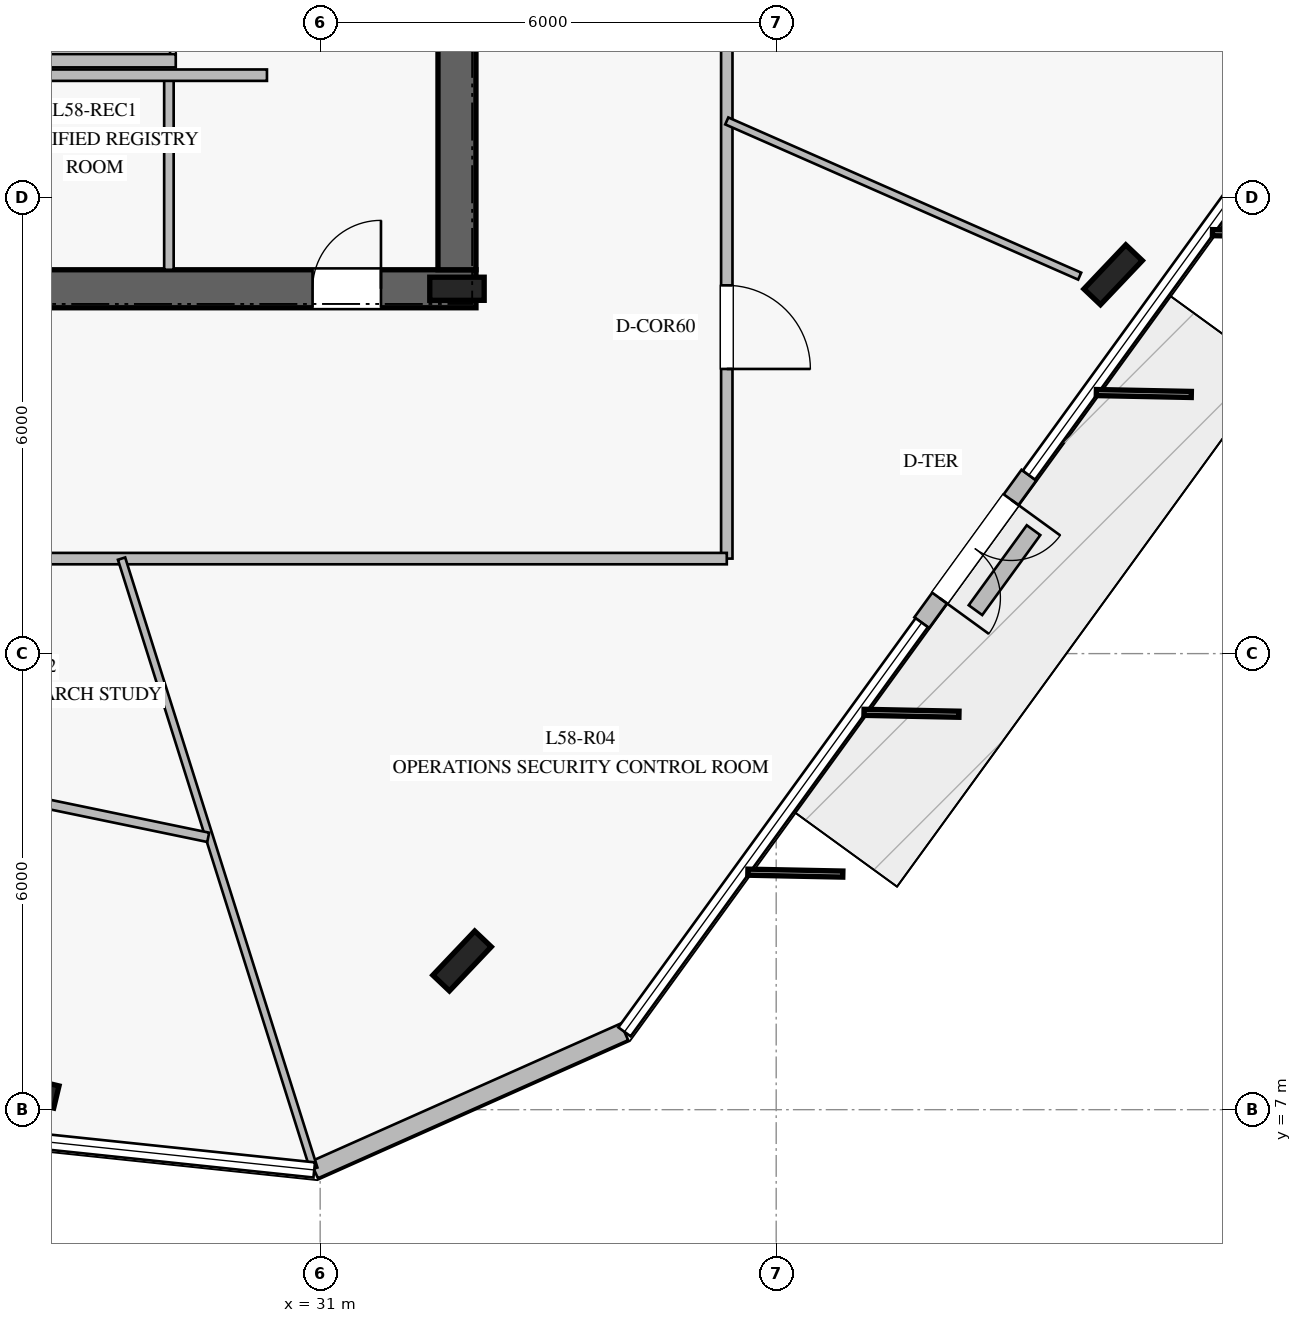
"""IFC4 building model, lengths in metres.
Left out: names, types, materials, properties, quantities, classifications, styles, units other than length and angle.
Written with IfcOpenShell. Run it as: python <this file> out.ifc"""

import sys

from ifc_helpers import new_model, si_unit, direction, frame, frame_2d, origin, origin_2d, place, context, subcontext, project, spatial, rectangle, i_section, extrude, element, fill, save


model = new_model("IFC4")
c1 = context("Model", 3, precision=1e-05, world=origin(), true_north=direction((0.0, 1.0)))
c2 = subcontext(c1, "Body", "Model", "MODEL_VIEW")
j1 = project(units=[si_unit("LENGTHUNIT", "METRE"), si_unit("PLANEANGLEUNIT", "RADIAN")], contexts=[c1])
p1 = place(None, origin())
s1 = spatial("IfcSite", under=j1, at=p1, CompositionType="ELEMENT")
p2 = place(p1, origin())
s2 = spatial("IfcBuilding", under=s1, at=p2, CompositionType="ELEMENT")
p3 = place(p2, frame((0.0, 0.0, 240.8)))
s3 = spatial("IfcBuildingStorey", under=s2, at=p3, CompositionType="ELEMENT", Elevation=240.8)
p4 = place(p3, frame((16.95, 17.8, 0.0), z_axis=(0.0, 0.0, 1.0), x_axis=(1.0, 0.0, 0.0)))
e1 = element("IfcWall", 1, at=p4, inside=s3, PredefinedType="SHEAR", context=c2, shape_type="SweptSolid", body=[
    extrude(rectangle(XDim=16.1, YDim=0.5, at=frame_2d((8.05, 0.0))), origin(), (0.0, 0.0, 1.0), 3.7),
])
p5 = place(p4, frame((5.0, 0.0, 0.0)))
e2 = element("IfcOpeningElement", 2, at=p5, cuts=e1, PredefinedType="OPENING", context=c2, shape_type="SweptSolid", body=[
    extrude(rectangle(XDim=1.2, YDim=2.25, at=frame_2d((0.6, 1.125))), frame((0.0, 0.26, 0.0), z_axis=(0.0, -1.0, 0.0), x_axis=(1.0, 0.0, 0.0)), (0.0, 0.0, 1.0), 0.52),
])
p6 = place(p4, frame((13.95, 0.0, 0.0)))
e3 = element("IfcOpeningElement", 3, at=p6, cuts=e1, PredefinedType="OPENING", context=c2, shape_type="SweptSolid", body=[
    extrude(rectangle(XDim=0.9, YDim=2.1, at=frame_2d((0.45, 1.05))), frame((0.0, 0.26, 0.0), z_axis=(0.0, -1.0, 0.0), x_axis=(1.0, 0.0, 0.0)), (0.0, 0.0, 1.0), 0.52),
])
p7 = place(p4, frame((9.2, 0.0, 0.0)))
e4 = element("IfcOpeningElement", 4, at=p7, cuts=e1, PredefinedType="OPENING", context=c2, shape_type="SweptSolid", body=[
    extrude(rectangle(XDim=1.1, YDim=2.2, at=frame_2d((0.55, 1.1))), frame((0.0, 0.26, 0.0), z_axis=(0.0, -1.0, 0.0), x_axis=(1.0, 0.0, 0.0)), (0.0, 0.0, 1.0), 0.52),
])
p8 = place(p3, frame((32.8, 18.05, 0.0), z_axis=(0.0, 0.0, 1.0), x_axis=(0.0, 1.0, 0.0)))
e5 = element("IfcWall", 5, at=p8, inside=s3, PredefinedType="SHEAR", context=c2, shape_type="SweptSolid", body=[
    extrude(rectangle(XDim=13.9, YDim=0.5, at=frame_2d((6.95, 0.0))), origin(), (0.0, 0.0, 1.0), 3.7),
])
p9 = place(p3, frame((32.8, 17.8, 0.0), z_axis=(0.0, 0.0, 1.0), x_axis=(1.0, 0.0, 0.0)))
e6 = element("IfcColumn", 6, at=p9, inside=s3, PredefinedType="COLUMN", context=c2, shape_type="SweptSolid", body=[
    extrude(i_section(OverallWidth=0.304, OverallDepth=0.716, WebThickness=0.021, FlangeThickness=0.04, at=origin_2d()), origin(), (0.0, 0.0, 1.0), 4.0),
])
for number, where, z_axis, x_axis in (
    (7, (32.867, 8.956, 0.0), (0.0, 0.0, 1.0), (0.688, 0.725, 0.0)),
    (8, (41.433, 17.984, 0.0), (0.0, 0.0, 1.0), (0.688, 0.725, 0.0)),
):
    element("IfcColumn", number, at=place(p3, frame(where, z_axis=z_axis, x_axis=x_axis)), inside=s3, PredefinedType="COLUMN", context=c2, shape_type="SweptSolid", body=[
        extrude(i_section(OverallWidth=0.3, OverallDepth=0.8, WebThickness=0.018, FlangeThickness=0.033, at=origin_2d()), origin(), (0.0, 0.0, 1.0), 4.0),
    ])
p10 = place(p3, frame((30.922, 6.207, 0.0), z_axis=(0.0, 0.0, 1.0), x_axis=(0.913581562374, 0.406655540833, 0.0)))
e9 = element("IfcWall", 9, at=p10, inside=s3, PredefinedType="STANDARD", context=c2, shape_type="SweptSolid", body=[
    extrude(rectangle(XDim=4.468, YDim=0.24, at=frame_2d((2.234, 0.0))), origin(), (0.0, 0.0, 1.0), 3.7),
])
p11 = place(p3, frame((38.915, 13.407, 0.0), z_axis=(0.0, 0.0, 1.0), x_axis=(0.58771776895, 0.809066019593, 0.0)))
e10 = element("IfcWall", 10, at=p11, inside=s3, PredefinedType="STANDARD", context=c2, shape_type="SweptSolid", body=[
    extrude(rectangle(XDim=2.399, YDim=0.24, at=frame_2d((1.199, 0.0))), origin(), (0.0, 0.0, 1.0), 3.7),
])
p12 = place(p11, frame((0.4, 0.0, 0.0)))
e11 = element("IfcOpeningElement", 11, at=p12, cuts=e10, PredefinedType="OPENING", context=c2, shape_type="SweptSolid", body=[
    extrude(rectangle(XDim=1.6, YDim=2.25, at=frame_2d((0.8, 1.125))), frame((0.0, 0.13, 0.0), z_axis=(0.0, -1.0, 0.0), x_axis=(1.0, 0.0, 0.0)), (0.0, 0.0, 1.0), 0.26),
])
p13 = place(p3, frame((39.622, 13.572, 0.0), z_axis=(0.0, 0.0, 1.0), x_axis=(0.587579763197, 0.809166251076, 0.0)))
e12 = element("IfcWall", 12, at=p13, inside=s3, PredefinedType="USERDEFINED", context=c2, shape_type="SweptSolid", body=[
    extrude(rectangle(XDim=1.3, YDim=0.22, at=frame_2d((0.65, 0.0))), origin(), (0.0, 0.0, 1.0), 0.4),
])
p14 = place(p3, frame((29.01, 18.05, 0.0), z_axis=(0.0, 0.0, 1.0), x_axis=(0.0, 1.0, 0.0)))
e13 = element("IfcWall", 13, at=p14, inside=s3, PredefinedType="PARTITIONING", context=c2, shape_type="SweptSolid", body=[
    extrude(rectangle(XDim=2.5, YDim=0.125, at=frame_2d((1.25, 0.0))), origin(), (0.0, 0.0, 1.0), 3.0),
])
p15 = place(p3, frame((24.4, 20.61, 0.0), z_axis=(0.0, 0.0, 1.0), x_axis=(1.0, 0.0, 0.0)))
e14 = element("IfcWall", 14, at=p15, inside=s3, PredefinedType="PARTITIONING", context=c2, shape_type="SweptSolid", body=[
    extrude(rectangle(XDim=5.9, YDim=0.15, at=frame_2d((2.95, 0.0))), origin(), (0.0, 0.0, 1.0), 3.7),
])
p16 = place(p3, frame((26.75, 20.8, 0.0), z_axis=(0.0, 0.0, 1.0), x_axis=(1.0, 0.0, 0.0)))
e15 = element("IfcWall", 15, at=p16, inside=s3, PredefinedType="PARTITIONING", context=c2, shape_type="SweptSolid", body=[
    extrude(rectangle(XDim=2.35, YDim=0.175, at=frame_2d((1.175, 0.0))), origin(), (0.0, 0.0, 1.0), 3.7),
])
p17 = place(p3, frame((36.35, 35.75, 0.0), z_axis=(0.0, 0.0, 1.0), x_axis=(0.0, -1.0, 0.0)))
e16 = element("IfcWall", 16, at=p17, inside=s3, PredefinedType="PARTITIONING", context=c2, shape_type="SweptSolid", body=[
    extrude(rectangle(XDim=21.5, YDim=0.15, at=frame_2d((10.75, 0.0))), origin(), (0.0, 0.0, 1.0), 3.2),
])
p18 = place(p17, frame((17.905, 0.0, 0.0)))
e17 = element("IfcOpeningElement", 17, at=p18, cuts=e16, PredefinedType="OPENING", context=c2, shape_type="SweptSolid", body=[
    extrude(rectangle(XDim=1.1, YDim=2.2, at=frame_2d((0.55, 1.1))), frame((0.0, 0.085, 0.0), z_axis=(0.0, -1.0, 0.0), x_axis=(1.0, 0.0, 0.0)), (0.0, 0.0, 1.0), 0.17),
])
p19 = place(p17, frame((9.193, 0.0, 0.0)))
e18 = element("IfcOpeningElement", 18, at=p19, cuts=e16, PredefinedType="OPENING", context=c2, shape_type="SweptSolid", body=[
    extrude(rectangle(XDim=1.1, YDim=2.2, at=frame_2d((0.55, 1.1))), frame((0.0, 0.085, 0.0), z_axis=(0.0, -1.0, 0.0), x_axis=(1.0, 0.0, 0.0)), (0.0, 0.0, 1.0), 0.17),
])
p20 = place(p3, frame((36.35, 14.25, 0.0), z_axis=(0.0, 0.0, 1.0), x_axis=(-1.0, 0.0, 0.0)))
e19 = element("IfcWall", 19, at=p20, inside=s3, PredefinedType="PARTITIONING", context=c2, shape_type="SweptSolid", body=[
    extrude(rectangle(XDim=22.7, YDim=0.15, at=frame_2d((11.35, 0.0))), origin(), (0.0, 0.0, 1.0), 3.2),
])
p21 = place(p20, frame((13.977, 0.0, 0.0)))
e20 = element("IfcOpeningElement", 20, at=p21, cuts=e19, PredefinedType="OPENING", context=c2, shape_type="SweptSolid", body=[
    extrude(rectangle(XDim=1.1, YDim=2.2, at=frame_2d((0.55, 1.1))), frame((0.0, 0.085, 0.0), z_axis=(0.0, -1.0, 0.0), x_axis=(1.0, 0.0, 0.0)), (0.0, 0.0, 1.0), 0.17),
])
p22 = place(p3, frame((28.387, 14.25, 0.0), z_axis=(0.0, 0.0, 1.0), x_axis=(0.300543965323, -0.953767961775, 0.0)))
e21 = element("IfcWall", 21, at=p22, inside=s3, PredefinedType="MOVABLE", context=c2, shape_type="SweptSolid", body=[
    extrude(rectangle(XDim=8.415, YDim=0.1, at=frame_2d((4.208, 0.0))), origin(), (0.0, 0.0, 1.0), 3.1),
])
p23 = place(p3, frame((36.35, 20.008, 0.0), z_axis=(0.0, 0.0, 1.0), x_axis=(0.915376770815, -0.402598270553, 0.0)))
e22 = element("IfcWall", 22, at=p23, inside=s3, PredefinedType="MOVABLE", context=c2, shape_type="SweptSolid", body=[
    extrude(rectangle(XDim=5.072, YDim=0.1, at=frame_2d((2.536, 0.0))), origin(), (0.0, 0.0, 1.0), 3.1),
])
p24 = place(p3, frame((14.631, 13.667, 0.0), z_axis=(0.0, 0.0, 1.0), x_axis=(0.979233619367, -0.202735094894, 0.0)))
e23 = element("IfcWall", 23, at=p24, inside=s3, PredefinedType="PARTITIONING", context=c2, shape_type="SweptSolid", body=[
    extrude(rectangle(XDim=15.212, YDim=0.125, at=frame_2d((7.606, 0.0))), origin(), (0.0, 0.0, 1.0), 3.2),
])
p25 = place(p24, frame((7.106, 0.0, 0.0)))
e24 = element("IfcOpeningElement", 24, at=p25, cuts=e23, PredefinedType="OPENING", context=c2, shape_type="SweptSolid", body=[
    extrude(rectangle(XDim=1.0, YDim=2.15, at=frame_2d((0.5, 1.075))), frame((0.0, 0.073, 0.0), z_axis=(0.0, -1.0, 0.0), x_axis=(1.0, 0.0, 0.0)), (0.0, 0.0, 1.0), 0.145),
])
p26 = place(p12, frame((1.6, 0.0, 0.0), z_axis=(0.0, 0.0, 1.0), x_axis=(-1.0, 0.0, 0.0)))
e25 = element("IfcDoor", 25, at=p26, inside=s3, OperationType="DOUBLE_DOOR_SINGLE_SWING", PredefinedType="DOOR", context=c2, shape_type="SweptSolid", body=[
    extrude(rectangle(XDim=1.6, YDim=2.25, at=frame_2d((0.8, 1.125))), frame((0.0, 0.025, 0.0), z_axis=(0.0, -1.0, 0.0), x_axis=(1.0, 0.0, 0.0)), (0.0, 0.0, 1.0), 0.05),
])
fill(e11, e25)
p27 = place(p6, origin())
e26 = element("IfcDoor", 26, at=p27, inside=s3, OperationType="SINGLE_SWING_RIGHT", PredefinedType="DOOR", context=c2, shape_type="SweptSolid", body=[
    extrude(rectangle(XDim=0.9, YDim=2.1, at=frame_2d((0.45, 1.05))), frame((0.0, 0.025, 0.0), z_axis=(0.0, -1.0, 0.0), x_axis=(1.0, 0.0, 0.0)), (0.0, 0.0, 1.0), 0.05),
])
fill(e3, e26)
p28 = place(p18, origin())
e27 = element("IfcDoor", 27, at=p28, inside=s3, OperationType="SINGLE_SWING_RIGHT", PredefinedType="DOOR", context=c2, shape_type="SweptSolid", body=[
    extrude(rectangle(XDim=1.1, YDim=2.2, at=frame_2d((0.55, 1.1))), frame((0.0, 0.025, 0.0), z_axis=(0.0, -1.0, 0.0), x_axis=(1.0, 0.0, 0.0)), (0.0, 0.0, 1.0), 0.05),
])
fill(e17, e27)
save(model, sys.argv[1])
